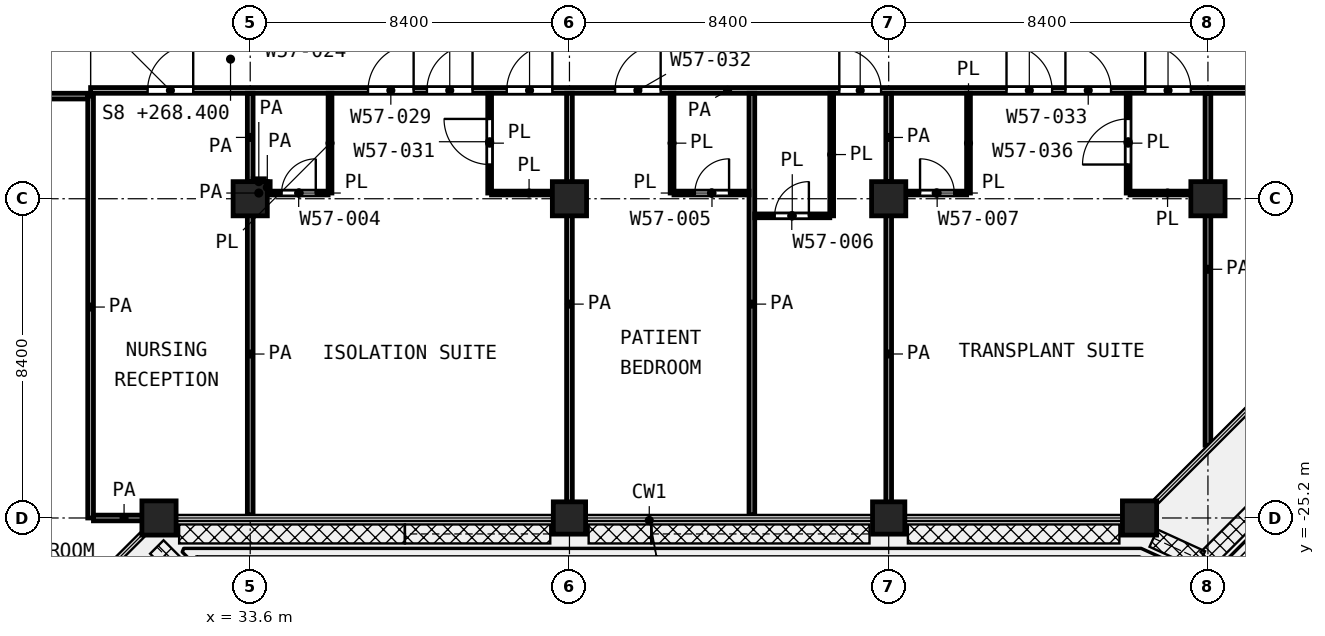
"""IFC4 building model, lengths in metres.
Left out: names, types, materials, properties, quantities, classifications, styles, units other than length and angle.
Written with IfcOpenShell. Run it as: python <this file> out.ifc"""

import sys

from ifc_helpers import new_model, si_unit, direction, frame, frame_2d, origin, origin_2d, place, context, subcontext, project, spatial, rectangle, extrude, element, fill, save


model = new_model("IFC4")
c1 = context("Model", 3, precision=1e-05, world=origin(), true_north=direction((0.0, 1.0)))
c2 = subcontext(c1, "Body", "Model", "MODEL_VIEW")
j1 = project(units=[si_unit("LENGTHUNIT", "METRE"), si_unit("PLANEANGLEUNIT", "RADIAN")], contexts=[c1])
p1 = place(None, origin())
s1 = spatial("IfcSite", under=j1, at=p1, CompositionType="ELEMENT")
p2 = place(p1, origin())
s2 = spatial("IfcBuilding", under=s1, at=p2, CompositionType="ELEMENT")
p3 = place(p2, frame((0.0, 0.0, 268.4)))
s3 = spatial("IfcBuildingStorey", under=s2, at=p3, CompositionType="ELEMENT", Elevation=268.4)
for number, where, z_axis, x_axis in (
    (1, (33.6, -16.8, 0.0), (0.0, 0.0, 1.0), (1.0, 0.0, 0.0)),
    (2, (42.0, -16.8, 0.0), (0.0, 0.0, 1.0), (1.0, 0.0, 0.0)),
    (3, (50.4, -16.8, 0.0), (0.0, 0.0, 1.0), (1.0, 0.0, 0.0)),
    (4, (58.8, -16.8, 0.0), (0.0, 0.0, 1.0), (1.0, 0.0, 0.0)),
    (5, (31.2, -25.2, 0.0), (0.0, 0.0, 1.0), (1.0, 0.0, 0.0)),
):
    element("IfcColumn", number, at=place(p3, frame(where, z_axis=z_axis, x_axis=x_axis)), inside=s3, PredefinedType="COLUMN", context=c2, shape_type="SweptSolid", body=[
        extrude(rectangle(XDim=0.9, YDim=0.9, at=origin_2d()), origin(), (0.0, 0.0, 1.0), 4.2),
    ])
for number, where, z_axis, x_axis in (
    (6, (42.0, -25.2, 0.0), (0.0, 0.0, 1.0), (1.0, 0.0, 0.0)),
    (7, (50.4, -25.2, 0.0), (0.0, 0.0, 1.0), (1.0, 0.0, 0.0)),
):
    element("IfcColumn", number, at=place(p3, frame(where, z_axis=z_axis, x_axis=x_axis)), inside=s3, PredefinedType="COLUMN", context=c2, shape_type="SweptSolid", body=[
        extrude(rectangle(XDim=0.85, YDim=0.85, at=origin_2d()), origin(), (0.0, 0.0, 1.0), 4.2),
    ])
p4 = place(p3, frame((57.0, -25.2, 0.0), z_axis=(0.0, 0.0, 1.0), x_axis=(1.0, 0.0, 0.0)))
e8 = element("IfcColumn", 8, at=p4, inside=s3, PredefinedType="COLUMN", context=c2, shape_type="SweptSolid", body=[
    extrude(rectangle(XDim=0.9, YDim=0.9, at=origin_2d()), origin(), (0.0, 0.0, 1.0), 4.2),
])
p5 = place(p3, frame((46.875, -17.25, 0.0), z_axis=(0.0, 0.0, 1.0), x_axis=(1.0, 0.0, 0.0)))
e9 = element("IfcWall", 9, at=p5, inside=s3, PredefinedType="PARTITIONING", context=c2, shape_type="SweptSolid", body=[
    extrude(rectangle(XDim=1.975, YDim=0.1, at=frame_2d((0.988, 0.0))), origin(), (0.0, 0.0, 1.0), 3.7),
])
p6 = place(p5, frame((0.525, 0.0, 0.0)))
e10 = element("IfcOpeningElement", 10, at=p6, cuts=e9, PredefinedType="OPENING", context=c2, shape_type="SweptSolid", body=[
    extrude(rectangle(XDim=0.9, YDim=2.1, at=frame_2d((0.45, 1.05))), frame((0.0, 0.06, 0.0), z_axis=(0.0, -1.0, 0.0), x_axis=(1.0, 0.0, 0.0)), (0.0, 0.0, 1.0), 0.12),
])
p7 = place(p3, frame((34.125, -16.65, 0.0), z_axis=(0.0, 0.0, 1.0), x_axis=(1.0, 0.0, 0.0)))
e11 = element("IfcWall", 11, at=p7, inside=s3, PredefinedType="PARTITIONING", context=c2, shape_type="SweptSolid", body=[
    extrude(rectangle(XDim=1.525, YDim=0.1, at=frame_2d((0.762, 0.0))), origin(), (0.0, 0.0, 1.0), 3.7),
])
p8 = place(p7, frame((0.3, 0.0, 0.0)))
e12 = element("IfcOpeningElement", 12, at=p8, cuts=e11, PredefinedType="OPENING", context=c2, shape_type="SweptSolid", body=[
    extrude(rectangle(XDim=0.9, YDim=2.1, at=frame_2d((0.45, 1.05))), frame((0.0, 0.06, 0.0), z_axis=(0.0, -1.0, 0.0), x_axis=(1.0, 0.0, 0.0)), (0.0, 0.0, 1.0), 0.12),
])
p9 = place(p3, frame((39.95, -16.65, 0.0), z_axis=(0.0, 0.0, 1.0), x_axis=(1.0, 0.0, 0.0)))
e13 = element("IfcWall", 13, at=p9, inside=s3, PredefinedType="PARTITIONING", context=c2, shape_type="SweptSolid", body=[
    extrude(rectangle(XDim=1.975, YDim=0.1, at=frame_2d((0.988, 0.0))), origin(), (0.0, 0.0, 1.0), 3.7),
])
p10 = place(p3, frame((44.75, -16.65, 0.0), z_axis=(0.0, 0.0, 1.0), x_axis=(1.0, 0.0, 0.0)))
e14 = element("IfcWall", 14, at=p10, inside=s3, PredefinedType="PARTITIONING", context=c2, shape_type="SweptSolid", body=[
    extrude(rectangle(XDim=1.975, YDim=0.1, at=frame_2d((0.988, 0.0))), origin(), (0.0, 0.0, 1.0), 3.7),
])
p11 = place(p10, frame((0.55, 0.0, 0.0)))
e15 = element("IfcOpeningElement", 15, at=p11, cuts=e14, PredefinedType="OPENING", context=c2, shape_type="SweptSolid", body=[
    extrude(rectangle(XDim=0.9, YDim=2.1, at=frame_2d((0.45, 1.05))), frame((0.0, 0.06, 0.0), z_axis=(0.0, -1.0, 0.0), x_axis=(1.0, 0.0, 0.0)), (0.0, 0.0, 1.0), 0.12),
])
p12 = place(p3, frame((50.85, -16.65, 0.0), z_axis=(0.0, 0.0, 1.0), x_axis=(1.0, 0.0, 0.0)))
e16 = element("IfcWall", 16, at=p12, inside=s3, PredefinedType="PARTITIONING", context=c2, shape_type="SweptSolid", body=[
    extrude(rectangle(XDim=1.6, YDim=0.1, at=frame_2d((0.8, 0.0))), origin(), (0.0, 0.0, 1.0), 3.7),
])
p13 = place(p12, frame((0.375, 0.0, 0.0)))
e17 = element("IfcOpeningElement", 17, at=p13, cuts=e16, PredefinedType="OPENING", context=c2, shape_type="SweptSolid", body=[
    extrude(rectangle(XDim=0.9, YDim=2.1, at=frame_2d((0.45, 1.05))), frame((0.0, 0.06, 0.0), z_axis=(0.0, -1.0, 0.0), x_axis=(1.0, 0.0, 0.0)), (0.0, 0.0, 1.0), 0.12),
])
p14 = place(p3, frame((56.75, -16.65, 0.0), z_axis=(0.0, 0.0, 1.0), x_axis=(1.0, 0.0, 0.0)))
e18 = element("IfcWall", 18, at=p14, inside=s3, PredefinedType="PARTITIONING", context=c2, shape_type="SweptSolid", body=[
    extrude(rectangle(XDim=1.975, YDim=0.1, at=frame_2d((0.988, 0.0))), origin(), (0.0, 0.0, 1.0), 3.7),
])
p15 = place(p3, frame((35.7, -16.65, 0.0), z_axis=(0.0, 0.0, 1.0), x_axis=(0.0, 1.0, 0.0)))
e19 = element("IfcWall", 19, at=p15, inside=s3, PredefinedType="PARTITIONING", context=c2, shape_type="SweptSolid", body=[
    extrude(rectangle(XDim=2.625, YDim=0.1, at=frame_2d((1.312, 0.0))), origin(), (0.0, 0.0, 1.0), 3.7),
])
p16 = place(p3, frame((39.9, -16.65, 0.0), z_axis=(0.0, 0.0, 1.0), x_axis=(0.0, 1.0, 0.0)))
e20 = element("IfcWall", 20, at=p16, inside=s3, PredefinedType="PARTITIONING", context=c2, shape_type="SweptSolid", body=[
    extrude(rectangle(XDim=2.625, YDim=0.1, at=frame_2d((1.312, 0.0))), origin(), (0.0, 0.0, 1.0), 3.7),
])
p17 = place(p16, frame((0.75, 0.0, 0.0)))
e21 = element("IfcOpeningElement", 21, at=p17, cuts=e20, PredefinedType="OPENING", context=c2, shape_type="SweptSolid", body=[
    extrude(rectangle(XDim=1.2, YDim=2.1, at=frame_2d((0.6, 1.05))), frame((0.0, 0.06, 0.0), z_axis=(0.0, -1.0, 0.0), x_axis=(1.0, 0.0, 0.0)), (0.0, 0.0, 1.0), 0.12),
])
p18 = place(p3, frame((44.7, -16.65, 0.0), z_axis=(0.0, 0.0, 1.0), x_axis=(0.0, 1.0, 0.0)))
e22 = element("IfcWall", 22, at=p18, inside=s3, PredefinedType="PARTITIONING", context=c2, shape_type="SweptSolid", body=[
    extrude(rectangle(XDim=2.625, YDim=0.1, at=frame_2d((1.312, 0.0))), origin(), (0.0, 0.0, 1.0), 3.7),
])
p19 = place(p3, frame((48.9, -17.25, 0.0), z_axis=(0.0, 0.0, 1.0), x_axis=(0.0, 1.0, 0.0)))
e23 = element("IfcWall", 23, at=p19, inside=s3, PredefinedType="PARTITIONING", context=c2, shape_type="SweptSolid", body=[
    extrude(rectangle(XDim=3.225, YDim=0.1, at=frame_2d((1.613, 0.0))), origin(), (0.0, 0.0, 1.0), 3.7),
])
p20 = place(p3, frame((52.5, -16.65, 0.0), z_axis=(0.0, 0.0, 1.0), x_axis=(0.0, 1.0, 0.0)))
e24 = element("IfcWall", 24, at=p20, inside=s3, PredefinedType="PARTITIONING", context=c2, shape_type="SweptSolid", body=[
    extrude(rectangle(XDim=2.625, YDim=0.1, at=frame_2d((1.312, 0.0))), origin(), (0.0, 0.0, 1.0), 3.7),
])
p21 = place(p3, frame((56.7, -16.65, 0.0), z_axis=(0.0, 0.0, 1.0), x_axis=(0.0, 1.0, 0.0)))
e25 = element("IfcWall", 25, at=p21, inside=s3, PredefinedType="PARTITIONING", context=c2, shape_type="SweptSolid", body=[
    extrude(rectangle(XDim=2.625, YDim=0.1, at=frame_2d((1.312, 0.0))), origin(), (0.0, 0.0, 1.0), 3.7),
])
p22 = place(p21, frame((0.75, 0.0, 0.0)))
e26 = element("IfcOpeningElement", 26, at=p22, cuts=e25, PredefinedType="OPENING", context=c2, shape_type="SweptSolid", body=[
    extrude(rectangle(XDim=1.2, YDim=2.1, at=frame_2d((0.6, 1.05))), frame((0.0, 0.06, 0.0), z_axis=(0.0, -1.0, 0.0), x_axis=(1.0, 0.0, 0.0)), (0.0, 0.0, 1.0), 0.12),
])
p23 = place(p3, frame((29.475, -25.2, 0.0), z_axis=(0.0, 0.0, 1.0), x_axis=(1.0, 0.0, 0.0)))
e27 = element("IfcWall", 27, at=p23, inside=s3, PredefinedType="PARTITIONING", context=c2, shape_type="SweptSolid", body=[
    extrude(rectangle(XDim=1.612, YDim=0.15, at=frame_2d((0.806, 0.0))), origin(), (0.0, 0.0, 1.0), 3.7),
])
for number, where, z_axis, x_axis in (
    (28, (33.677, -16.65, 0.0), (0.0, 0.0, 1.0), (1.0, 0.0, 0.0)),
    (29, (33.677, -16.35, 0.0), (0.0, 0.0, 1.0), (1.0, 0.0, 0.0)),
):
    element("IfcWall", number, at=place(p3, frame(where, z_axis=z_axis, x_axis=x_axis)), inside=s3, PredefinedType="PARTITIONING", context=c2, shape_type="SweptSolid", body=[
        extrude(rectangle(XDim=0.298, YDim=0.15, at=frame_2d((0.149, 0.0))), origin(), (0.0, 0.0, 1.0), 3.7),
    ])
p24 = place(p3, frame((24.8, -14.1, 0.0), z_axis=(0.0, 0.0, 1.0), x_axis=(1.0, 0.0, 0.0)))
e30 = element("IfcWall", 30, at=p24, inside=s3, PredefinedType="PARTITIONING", context=c2, shape_type="SweptSolid", body=[
    extrude(rectangle(XDim=4.525, YDim=0.15, at=frame_2d((2.262, 0.0))), origin(), (0.0, 0.0, 1.0), 3.7),
])
p25 = place(p24, frame((1.75, 0.0, 0.0)))
e31 = element("IfcOpeningElement", 31, at=p25, cuts=e30, PredefinedType="OPENING", context=c2, shape_type="SweptSolid", body=[
    extrude(rectangle(XDim=1.5, YDim=2.1, at=frame_2d((0.75, 1.05))), frame((0.0, 0.085, 0.0), z_axis=(0.0, -1.0, 0.0), x_axis=(1.0, 0.0, 0.0)), (0.0, 0.0, 1.0), 0.17),
])
p26 = place(p3, frame((29.4, -13.95, 0.0), z_axis=(0.0, 0.0, 1.0), x_axis=(1.0, 0.0, 0.0)))
e32 = element("IfcWall", 32, at=p26, inside=s3, PredefinedType="PARTITIONING", context=c2, shape_type="SweptSolid", body=[
    extrude(rectangle(XDim=33.52, YDim=0.15, at=frame_2d((16.76, 0.0))), origin(), (0.0, 0.0, 1.0), 3.7),
])
p27 = place(p26, frame((1.5, 0.0, 0.0)))
e33 = element("IfcOpeningElement", 33, at=p27, cuts=e32, PredefinedType="OPENING", context=c2, shape_type="SweptSolid", body=[
    extrude(rectangle(XDim=1.2, YDim=2.1, at=frame_2d((0.6, 1.05))), frame((0.0, 0.085, 0.0), z_axis=(0.0, -1.0, 0.0), x_axis=(1.0, 0.0, 0.0)), (0.0, 0.0, 1.0), 0.17),
])
p28 = place(p26, frame((8.85, 0.0, 0.0)))
e34 = element("IfcOpeningElement", 34, at=p28, cuts=e32, PredefinedType="OPENING", context=c2, shape_type="SweptSolid", body=[
    extrude(rectangle(XDim=1.2, YDim=2.1, at=frame_2d((0.6, 1.05))), frame((0.0, 0.085, 0.0), z_axis=(0.0, -1.0, 0.0), x_axis=(1.0, 0.0, 0.0)), (0.0, 0.0, 1.0), 0.17),
])
p29 = place(p26, frame((7.3, 0.0, 0.0)))
e35 = element("IfcOpeningElement", 35, at=p29, cuts=e32, PredefinedType="OPENING", context=c2, shape_type="SweptSolid", body=[
    extrude(rectangle(XDim=1.2, YDim=2.1, at=frame_2d((0.6, 1.05))), frame((0.0, 0.085, 0.0), z_axis=(0.0, -1.0, 0.0), x_axis=(1.0, 0.0, 0.0)), (0.0, 0.0, 1.0), 0.17),
])
p30 = place(p26, frame((10.95, 0.0, 0.0)))
e36 = element("IfcOpeningElement", 36, at=p30, cuts=e32, PredefinedType="OPENING", context=c2, shape_type="SweptSolid", body=[
    extrude(rectangle(XDim=1.2, YDim=2.1, at=frame_2d((0.6, 1.05))), frame((0.0, 0.085, 0.0), z_axis=(0.0, -1.0, 0.0), x_axis=(1.0, 0.0, 0.0)), (0.0, 0.0, 1.0), 0.17),
])
p31 = place(p26, frame((13.8, 0.0, 0.0)))
e37 = element("IfcOpeningElement", 37, at=p31, cuts=e32, PredefinedType="OPENING", context=c2, shape_type="SweptSolid", body=[
    extrude(rectangle(XDim=1.2, YDim=2.1, at=frame_2d((0.6, 1.05))), frame((0.0, 0.085, 0.0), z_axis=(0.0, -1.0, 0.0), x_axis=(1.0, 0.0, 0.0)), (0.0, 0.0, 1.0), 0.17),
])
p32 = place(p26, frame((19.7, 0.0, 0.0)))
e38 = element("IfcOpeningElement", 38, at=p32, cuts=e32, PredefinedType="OPENING", context=c2, shape_type="SweptSolid", body=[
    extrude(rectangle(XDim=1.1, YDim=2.1, at=frame_2d((0.55, 1.05))), frame((0.0, 0.085, 0.0), z_axis=(0.0, -1.0, 0.0), x_axis=(1.0, 0.0, 0.0)), (0.0, 0.0, 1.0), 0.17),
])
p33 = place(p26, frame((25.65, 0.0, 0.0)))
e39 = element("IfcOpeningElement", 39, at=p33, cuts=e32, PredefinedType="OPENING", context=c2, shape_type="SweptSolid", body=[
    extrude(rectangle(XDim=1.2, YDim=2.1, at=frame_2d((0.6, 1.05))), frame((0.0, 0.085, 0.0), z_axis=(0.0, -1.0, 0.0), x_axis=(1.0, 0.0, 0.0)), (0.0, 0.0, 1.0), 0.17),
])
p34 = place(p26, frame((24.1, 0.0, 0.0)))
e40 = element("IfcOpeningElement", 40, at=p34, cuts=e32, PredefinedType="OPENING", context=c2, shape_type="SweptSolid", body=[
    extrude(rectangle(XDim=1.2, YDim=2.1, at=frame_2d((0.6, 1.05))), frame((0.0, 0.085, 0.0), z_axis=(0.0, -1.0, 0.0), x_axis=(1.0, 0.0, 0.0)), (0.0, 0.0, 1.0), 0.17),
])
p35 = place(p26, frame((27.75, 0.0, 0.0)))
e41 = element("IfcOpeningElement", 41, at=p35, cuts=e32, PredefinedType="OPENING", context=c2, shape_type="SweptSolid", body=[
    extrude(rectangle(XDim=1.2, YDim=2.1, at=frame_2d((0.6, 1.05))), frame((0.0, 0.085, 0.0), z_axis=(0.0, -1.0, 0.0), x_axis=(1.0, 0.0, 0.0)), (0.0, 0.0, 1.0), 0.17),
])
p36 = place(p26, frame((31.0, 0.0, 0.0)))
e42 = element("IfcOpeningElement", 42, at=p36, cuts=e32, PredefinedType="OPENING", context=c2, shape_type="SweptSolid", body=[
    extrude(rectangle(XDim=1.0, YDim=2.1, at=frame_2d((0.5, 1.05))), frame((0.0, 0.085, 0.0), z_axis=(0.0, -1.0, 0.0), x_axis=(1.0, 0.0, 0.0)), (0.0, 0.0, 1.0), 0.17),
])
p37 = place(p3, frame((29.4, -25.2, 0.0), z_axis=(0.0, 0.0, 1.0), x_axis=(0.0, 1.0, 0.0)))
e43 = element("IfcWall", 43, at=p37, inside=s3, PredefinedType="PARTITIONING", context=c2, shape_type="SweptSolid", body=[
    extrude(rectangle(XDim=11.1, YDim=0.15, at=frame_2d((5.55, 0.0))), origin(), (0.0, 0.0, 1.0), 3.7),
])
p38 = place(p3, frame((33.6, -25.12, 0.0), z_axis=(0.0, 0.0, 1.0), x_axis=(0.0, 1.0, 0.0)))
e44 = element("IfcWall", 44, at=p38, inside=s3, PredefinedType="PARTITIONING", context=c2, shape_type="SweptSolid", body=[
    extrude(rectangle(XDim=8.468, YDim=0.15, at=frame_2d((4.234, 0.0))), origin(), (0.0, 0.0, 1.0), 3.7),
])
p39 = place(p3, frame((33.6, -16.348, 0.0), z_axis=(0.0, 0.0, 1.0), x_axis=(0.0, 1.0, 0.0)))
e45 = element("IfcWall", 45, at=p39, inside=s3, PredefinedType="PARTITIONING", context=c2, shape_type="SweptSolid", body=[
    extrude(rectangle(XDim=2.323, YDim=0.15, at=frame_2d((1.162, 0.0))), origin(), (0.0, 0.0, 1.0), 3.7),
])
p40 = place(p3, frame((34.05, -16.65, 0.0), z_axis=(0.0, 0.0, 1.0), x_axis=(0.0, 1.0, 0.0)))
e46 = element("IfcWall", 46, at=p40, inside=s3, PredefinedType="PARTITIONING", context=c2, shape_type="SweptSolid", body=[
    extrude(rectangle(XDim=0.3, YDim=0.15, at=frame_2d((0.15, 0.0))), origin(), (0.0, 0.0, 1.0), 3.7),
])
for number, where, z_axis, x_axis in (
    (47, (42.0, -25.12, 0.0), (0.0, 0.0, 1.0), (0.0, 1.0, 0.0)),
    (48, (46.8, -25.12, 0.0), (0.0, 0.0, 1.0), (0.0, 1.0, 0.0)),
):
    element("IfcWall", number, at=place(p3, frame(where, z_axis=z_axis, x_axis=x_axis)), inside=s3, PredefinedType="PARTITIONING", context=c2, shape_type="SweptSolid", body=[
        extrude(rectangle(XDim=11.095, YDim=0.15, at=frame_2d((5.548, 0.0))), origin(), (0.0, 0.0, 1.0), 3.7),
    ])
p41 = place(p3, frame((50.4, -25.12, 0.0), z_axis=(0.0, 0.0, 1.0), x_axis=(0.0, 1.0, 0.0)))
e49 = element("IfcWall", 49, at=p41, inside=s3, PredefinedType="PARTITIONING", context=c2, shape_type="SweptSolid", body=[
    extrude(rectangle(XDim=8.47, YDim=0.15, at=frame_2d((4.235, 0.0))), origin(), (0.0, 0.0, 1.0), 3.7),
])
p42 = place(p3, frame((50.4, -16.35, 0.0), z_axis=(0.0, 0.0, 1.0), x_axis=(0.0, 1.0, 0.0)))
e50 = element("IfcWall", 50, at=p42, inside=s3, PredefinedType="PARTITIONING", context=c2, shape_type="SweptSolid", body=[
    extrude(rectangle(XDim=2.325, YDim=0.15, at=frame_2d((1.163, 0.0))), origin(), (0.0, 0.0, 1.0), 3.7),
])
p43 = place(p3, frame((58.8, -23.287, 0.0), z_axis=(0.0, 0.0, 1.0), x_axis=(0.0, 1.0, 0.0)))
e51 = element("IfcWall", 51, at=p43, inside=s3, PredefinedType="PARTITIONING", context=c2, shape_type="SweptSolid", body=[
    extrude(rectangle(XDim=9.262, YDim=0.15, at=frame_2d((4.631, 0.0))), origin(), (0.0, 0.0, 1.0), 3.7),
])
p44 = place(p27, origin())
e52 = element("IfcDoor", 52, at=p44, inside=s3, OperationType="SINGLE_SWING_RIGHT", PredefinedType="DOOR", context=c2, shape_type="SweptSolid", body=[
    extrude(rectangle(XDim=1.2, YDim=2.1, at=frame_2d((0.6, 1.05))), frame((0.0, 0.025, 0.0), z_axis=(0.0, -1.0, 0.0), x_axis=(1.0, 0.0, 0.0)), (0.0, 0.0, 1.0), 0.05),
])
fill(e33, e52)
p45 = place(p28, origin())
e53 = element("IfcDoor", 53, at=p45, inside=s3, OperationType="SINGLE_SWING_RIGHT", PredefinedType="DOOR", context=c2, shape_type="SweptSolid", body=[
    extrude(rectangle(XDim=1.2, YDim=2.1, at=frame_2d((0.6, 1.05))), frame((0.0, 0.025, 0.0), z_axis=(0.0, -1.0, 0.0), x_axis=(1.0, 0.0, 0.0)), (0.0, 0.0, 1.0), 0.05),
])
fill(e34, e53)
p46 = place(p29, origin())
e54 = element("IfcDoor", 54, at=p46, inside=s3, OperationType="SINGLE_SWING_RIGHT", PredefinedType="DOOR", context=c2, shape_type="SweptSolid", body=[
    extrude(rectangle(XDim=1.2, YDim=2.1, at=frame_2d((0.6, 1.05))), frame((0.0, 0.025, 0.0), z_axis=(0.0, -1.0, 0.0), x_axis=(1.0, 0.0, 0.0)), (0.0, 0.0, 1.0), 0.05),
])
fill(e35, e54)
p47 = place(p30, origin())
e55 = element("IfcDoor", 55, at=p47, inside=s3, OperationType="SINGLE_SWING_RIGHT", PredefinedType="DOOR", context=c2, shape_type="SweptSolid", body=[
    extrude(rectangle(XDim=1.2, YDim=2.1, at=frame_2d((0.6, 1.05))), frame((0.0, 0.025, 0.0), z_axis=(0.0, -1.0, 0.0), x_axis=(1.0, 0.0, 0.0)), (0.0, 0.0, 1.0), 0.05),
])
fill(e36, e55)
p48 = place(p17, origin())
e56 = element("IfcDoor", 56, at=p48, inside=s3, OperationType="SINGLE_SWING_RIGHT", PredefinedType="DOOR", context=c2, shape_type="SweptSolid", body=[
    extrude(rectangle(XDim=1.2, YDim=2.1, at=frame_2d((0.6, 1.05))), frame((0.0, 0.025, 0.0), z_axis=(0.0, -1.0, 0.0), x_axis=(1.0, 0.0, 0.0)), (0.0, 0.0, 1.0), 0.05),
])
fill(e21, e56)
p49 = place(p8, origin())
e57 = element("IfcDoor", 57, at=p49, inside=s3, OperationType="SINGLE_SWING_RIGHT", PredefinedType="DOOR", context=c2, shape_type="SweptSolid", body=[
    extrude(rectangle(XDim=0.9, YDim=2.1, at=frame_2d((0.45, 1.05))), frame((0.0, 0.025, 0.0), z_axis=(0.0, -1.0, 0.0), x_axis=(1.0, 0.0, 0.0)), (0.0, 0.0, 1.0), 0.05),
])
fill(e12, e57)
p50 = place(p31, origin())
e58 = element("IfcDoor", 58, at=p50, inside=s3, OperationType="SINGLE_SWING_RIGHT", PredefinedType="DOOR", context=c2, shape_type="SweptSolid", body=[
    extrude(rectangle(XDim=1.2, YDim=2.1, at=frame_2d((0.6, 1.05))), frame((0.0, 0.025, 0.0), z_axis=(0.0, -1.0, 0.0), x_axis=(1.0, 0.0, 0.0)), (0.0, 0.0, 1.0), 0.05),
])
fill(e37, e58)
p51 = place(p11, origin())
e59 = element("IfcDoor", 59, at=p51, inside=s3, OperationType="SINGLE_SWING_RIGHT", PredefinedType="DOOR", context=c2, shape_type="SweptSolid", body=[
    extrude(rectangle(XDim=0.9, YDim=2.1, at=frame_2d((0.45, 1.05))), frame((0.0, 0.025, 0.0), z_axis=(0.0, -1.0, 0.0), x_axis=(1.0, 0.0, 0.0)), (0.0, 0.0, 1.0), 0.05),
])
fill(e15, e59)
p52 = place(p32, origin())
e60 = element("IfcDoor", 60, at=p52, inside=s3, OperationType="SINGLE_SWING_LEFT", PredefinedType="DOOR", context=c2, shape_type="SweptSolid", body=[
    extrude(rectangle(XDim=1.1, YDim=2.1, at=frame_2d((0.55, 1.05))), frame((0.0, 0.025, 0.0), z_axis=(0.0, -1.0, 0.0), x_axis=(1.0, 0.0, 0.0)), (0.0, 0.0, 1.0), 0.05),
])
fill(e38, e60)
p53 = place(p6, origin())
e61 = element("IfcDoor", 61, at=p53, inside=s3, OperationType="SINGLE_SWING_RIGHT", PredefinedType="DOOR", context=c2, shape_type="SweptSolid", body=[
    extrude(rectangle(XDim=0.9, YDim=2.1, at=frame_2d((0.45, 1.05))), frame((0.0, 0.025, 0.0), z_axis=(0.0, -1.0, 0.0), x_axis=(1.0, 0.0, 0.0)), (0.0, 0.0, 1.0), 0.05),
])
fill(e10, e61)
p54 = place(p33, origin())
e62 = element("IfcDoor", 62, at=p54, inside=s3, OperationType="SINGLE_SWING_LEFT", PredefinedType="DOOR", context=c2, shape_type="SweptSolid", body=[
    extrude(rectangle(XDim=1.2, YDim=2.1, at=frame_2d((0.6, 1.05))), frame((0.0, 0.025, 0.0), z_axis=(0.0, -1.0, 0.0), x_axis=(1.0, 0.0, 0.0)), (0.0, 0.0, 1.0), 0.05),
])
fill(e39, e62)
p55 = place(p34, origin())
e63 = element("IfcDoor", 63, at=p55, inside=s3, OperationType="SINGLE_SWING_LEFT", PredefinedType="DOOR", context=c2, shape_type="SweptSolid", body=[
    extrude(rectangle(XDim=1.2, YDim=2.1, at=frame_2d((0.6, 1.05))), frame((0.0, 0.025, 0.0), z_axis=(0.0, -1.0, 0.0), x_axis=(1.0, 0.0, 0.0)), (0.0, 0.0, 1.0), 0.05),
])
fill(e40, e63)
p56 = place(p35, origin())
e64 = element("IfcDoor", 64, at=p56, inside=s3, OperationType="SINGLE_SWING_LEFT", PredefinedType="DOOR", context=c2, shape_type="SweptSolid", body=[
    extrude(rectangle(XDim=1.2, YDim=2.1, at=frame_2d((0.6, 1.05))), frame((0.0, 0.025, 0.0), z_axis=(0.0, -1.0, 0.0), x_axis=(1.0, 0.0, 0.0)), (0.0, 0.0, 1.0), 0.05),
])
fill(e41, e64)
p57 = place(p22, origin())
e65 = element("IfcDoor", 65, at=p57, inside=s3, OperationType="SINGLE_SWING_LEFT", PredefinedType="DOOR", context=c2, shape_type="SweptSolid", body=[
    extrude(rectangle(XDim=1.2, YDim=2.1, at=frame_2d((0.6, 1.05))), frame((0.0, 0.025, 0.0), z_axis=(0.0, -1.0, 0.0), x_axis=(1.0, 0.0, 0.0)), (0.0, 0.0, 1.0), 0.05),
])
fill(e26, e65)
p58 = place(p13, origin())
e66 = element("IfcDoor", 66, at=p58, inside=s3, OperationType="SINGLE_SWING_LEFT", PredefinedType="DOOR", context=c2, shape_type="SweptSolid", body=[
    extrude(rectangle(XDim=0.9, YDim=2.1, at=frame_2d((0.45, 1.05))), frame((0.0, 0.025, 0.0), z_axis=(0.0, -1.0, 0.0), x_axis=(1.0, 0.0, 0.0)), (0.0, 0.0, 1.0), 0.05),
])
fill(e17, e66)
save(model, sys.argv[1])
